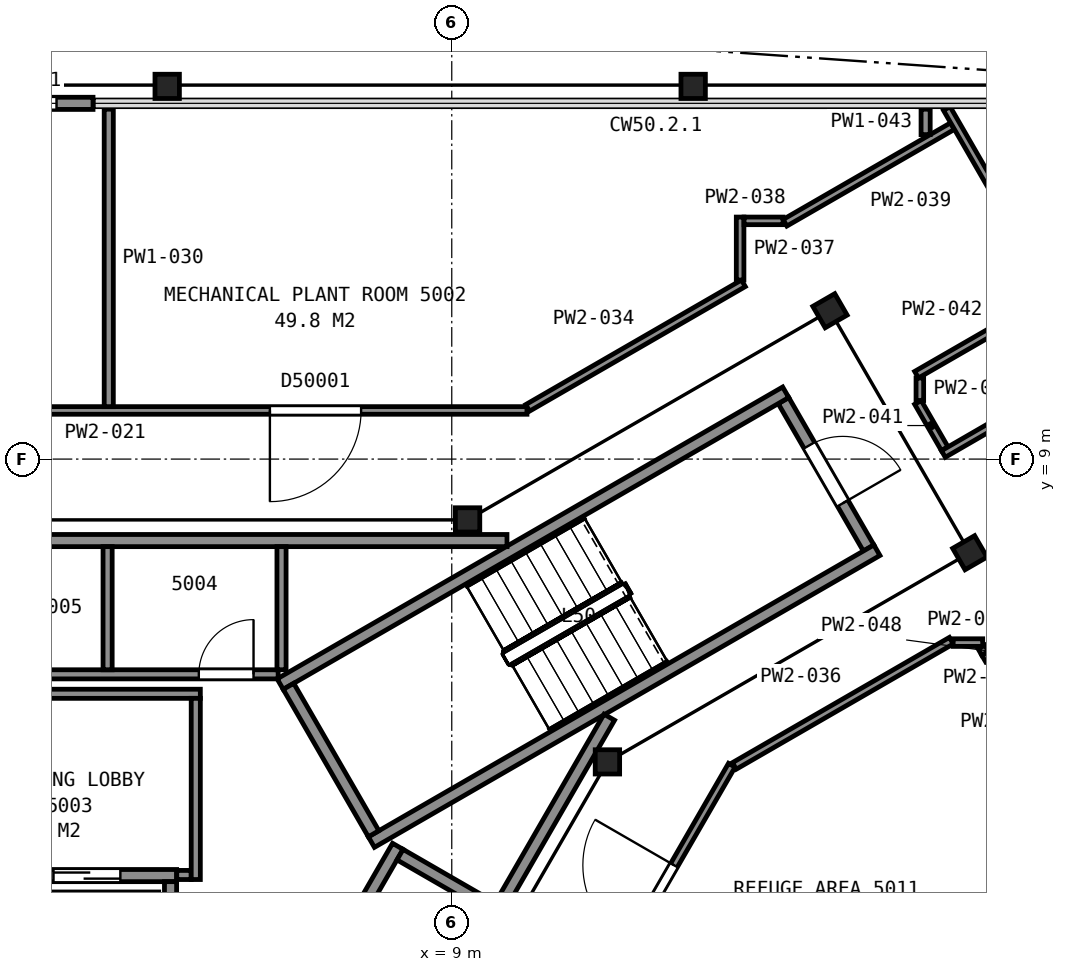
"""IFC4 building model, lengths in metres.
Left out: names, types, materials, properties, quantities, classifications, styles, units other than length and angle.
Written with IfcOpenShell. Run it as: python <this file> out.ifc"""

import sys

from ifc_helpers import new_model, si_unit, direction, frame, frame_2d, origin, origin_2d, place, context, subcontext, project, spatial, rectangle, i_section, extrude, element, fill, save


model = new_model("IFC4")
c1 = context("Model", 3, precision=1e-05, world=origin(), true_north=direction((0.0, 1.0)))
c2 = subcontext(c1, "Body", "Model", "MODEL_VIEW")
j1 = project(units=[si_unit("LENGTHUNIT", "METRE"), si_unit("PLANEANGLEUNIT", "RADIAN")], contexts=[c1])
p1 = place(None, origin())
s1 = spatial("IfcSite", under=j1, at=p1, CompositionType="ELEMENT")
p2 = place(p1, origin())
s2 = spatial("IfcBuilding", under=s1, at=p2, CompositionType="ELEMENT")
p3 = place(p2, frame((0.0, 0.0, 200.6)))
s3 = spatial("IfcBuildingStorey", under=s2, at=p3, CompositionType="ELEMENT", Elevation=200.6)
for number, where, z_axis, x_axis in (
    (1, (12.97, 15.13, -0.16), (0.0, 0.0, 1.0), (1.0, 0.0, 0.0)),
    (2, (4.32, 15.13, -0.16), (0.0, 0.0, 1.0), (1.0, 0.0, 0.0)),
):
    element("IfcColumn", number, at=place(p3, frame(where, z_axis=z_axis, x_axis=x_axis)), inside=s3, PredefinedType="COLUMN", context=c2, shape_type="SweptSolid", body=[
        extrude(i_section(OverallWidth=0.401, OverallDepth=0.399, WebThickness=0.025, FlangeThickness=0.04, FilletRadius=0.015, at=origin_2d()), origin(), (0.0, 0.0, 1.0), 5.96),
    ])
p4 = place(p3, frame((11.56, 4.02, 0.0), z_axis=(0.0, 0.0, 1.0), x_axis=(1.0, 0.0, 0.0)))
e3 = element("IfcColumn", 3, at=p4, inside=s3, PredefinedType="COLUMN", context=c2, shape_type="SweptSolid", body=[
    extrude(i_section(OverallWidth=0.401, OverallDepth=0.399, WebThickness=0.025, FlangeThickness=0.04, FilletRadius=0.015, at=origin_2d()), origin(), (0.0, 0.0, 1.0), 5.8),
])
for number, where, z_axis, x_axis in (
    (4, (17.52, 7.46, 0.0), (0.0, 0.0, 1.0), (0.5, -0.866, 0.0)),
    (5, (15.22, 11.44, 0.0), (0.0, 0.0, 1.0), (0.5, -0.866, 0.0)),
):
    element("IfcColumn", number, at=place(p3, frame(where, z_axis=z_axis, x_axis=x_axis)), inside=s3, PredefinedType="COLUMN", context=c2, shape_type="SweptSolid", body=[
        extrude(i_section(OverallWidth=0.406, OverallDepth=0.417, WebThickness=0.03, FlangeThickness=0.048, FilletRadius=0.015, at=origin_2d()), origin(), (0.0, 0.0, 1.0), 5.8),
    ])
p5 = place(p3, frame((9.26, 8.0, 0.0), z_axis=(0.0, 0.0, 1.0), x_axis=(1.0, 0.0, 0.0)))
e6 = element("IfcColumn", 6, at=p5, inside=s3, PredefinedType="COLUMN", context=c2, shape_type="SweptSolid", body=[
    extrude(i_section(OverallWidth=0.401, OverallDepth=0.399, WebThickness=0.025, FlangeThickness=0.04, FilletRadius=0.015, at=origin_2d()), origin(), (0.0, 0.0, 1.0), 5.8),
])
p6 = place(p3, frame((3.1, 14.851, 0.0), z_axis=(0.0, 0.0, 1.0), x_axis=(-1.0, 0.0, 0.0)))
e7 = element("IfcWall", 7, at=p6, inside=s3, PredefinedType="SOLIDWALL", context=c2, shape_type="SweptSolid", body=[
    extrude(rectangle(XDim=6.2, YDim=0.2, at=frame_2d((3.1, 0.0))), origin(), (0.0, 0.0, 1.0), 4.522),
])
p7 = place(p6, frame((0.6, 0.0, 0.9)))
e8 = element("IfcOpeningElement", 8, at=p7, cuts=e7, PredefinedType="OPENING", context=c2, shape_type="SweptSolid", body=[
    extrude(rectangle(XDim=1.0, YDim=1.5, at=frame_2d((0.5, 0.75))), frame((0.0, 0.11, 0.0), z_axis=(0.0, -1.0, 0.0), x_axis=(1.0, 0.0, 0.0)), (0.0, 0.0, 1.0), 0.22),
])
p8 = place(p6, frame((2.2, 0.0, 0.0)))
e9 = element("IfcOpeningElement", 9, at=p8, cuts=e7, PredefinedType="OPENING", context=c2, shape_type="SweptSolid", body=[
    extrude(rectangle(XDim=1.8, YDim=2.4, at=frame_2d((0.9, 1.2))), frame((0.0, 0.11, 0.0), z_axis=(0.0, -1.0, 0.0), x_axis=(1.0, 0.0, 0.0)), (0.0, 0.0, 1.0), 0.22),
])
p9 = place(p6, frame((4.6, 0.0, 0.9)))
e10 = element("IfcOpeningElement", 10, at=p9, cuts=e7, PredefinedType="OPENING", context=c2, shape_type="SweptSolid", body=[
    extrude(rectangle(XDim=1.0, YDim=1.5, at=frame_2d((0.5, 0.75))), frame((0.0, 0.11, 0.0), z_axis=(0.0, -1.0, 0.0), x_axis=(1.0, 0.0, 0.0)), (0.0, 0.0, 1.0), 0.22),
])
p10 = place(p3, frame((16.267, -1.527, 0.0), z_axis=(0.0, 0.0, 1.0), x_axis=(0.499997426962, 0.866026889324, 0.0)))
e11 = element("IfcWall", 11, at=p10, inside=s3, PredefinedType="SOLIDWALL", context=c2, shape_type="SweptSolid", body=[
    extrude(rectangle(XDim=6.2, YDim=0.2, at=frame_2d((3.1, 0.0))), origin(), (0.0, 0.0, 1.0), 4.522),
])
p11 = place(p10, frame((0.6, 0.0, 0.9)))
e12 = element("IfcOpeningElement", 12, at=p11, cuts=e11, PredefinedType="OPENING", context=c2, shape_type="SweptSolid", body=[
    extrude(rectangle(XDim=1.0, YDim=1.5, at=frame_2d((0.5, 0.75))), frame((0.0, 0.11, 0.0), z_axis=(0.0, -1.0, 0.0), x_axis=(1.0, 0.0, 0.0)), (0.0, 0.0, 1.0), 0.22),
])
p12 = place(p10, frame((2.2, 0.0, 0.0)))
e13 = element("IfcOpeningElement", 13, at=p12, cuts=e11, PredefinedType="OPENING", context=c2, shape_type="SweptSolid", body=[
    extrude(rectangle(XDim=1.8, YDim=2.4, at=frame_2d((0.9, 1.2))), frame((0.0, 0.11, 0.0), z_axis=(0.0, -1.0, 0.0), x_axis=(1.0, 0.0, 0.0)), (0.0, 0.0, 1.0), 0.22),
])
p13 = place(p10, frame((4.6, 0.0, 0.9)))
e14 = element("IfcOpeningElement", 14, at=p13, cuts=e11, PredefinedType="OPENING", context=c2, shape_type="SweptSolid", body=[
    extrude(rectangle(XDim=1.0, YDim=1.5, at=frame_2d((0.5, 0.75))), frame((0.0, 0.11, 0.0), z_axis=(0.0, -1.0, 0.0), x_axis=(1.0, 0.0, 0.0)), (0.0, 0.0, 1.0), 0.22),
])
p14 = place(p3, frame((15.855, 7.538, 0.0), z_axis=(0.0, 0.0, 1.0), x_axis=(-0.500049511043, 0.865996816683, 0.0)))
e15 = element("IfcWall", 15, at=p14, inside=s3, PredefinedType="PARTITIONING", context=c2, shape_type="SweptSolid", body=[
    extrude(rectangle(XDim=2.8, YDim=0.2, at=frame_2d((1.4, 0.0))), origin(), (0.0, 0.0, 1.0), 5.55),
])
p15 = place(p14, frame((0.85, 0.0, 0.0)))
e16 = element("IfcOpeningElement", 16, at=p15, cuts=e15, PredefinedType="OPENING", context=c2, shape_type="SweptSolid", body=[
    extrude(rectangle(XDim=1.1, YDim=2.1, at=frame_2d((0.55, 1.05))), frame((0.0, 0.11, 0.0), z_axis=(0.0, -1.0, 0.0), x_axis=(1.0, 0.0, 0.0)), (0.0, 0.0, 1.0), 0.22),
])
for number, where, z_axis, x_axis in (
    (17, (6.178, 5.299, 0.0), (0.0, 0.0, 1.0), (0.866, 0.5, 0.0)),
    (18, (7.678, 2.701, 0.0), (0.0, 0.0, 1.0), (0.866, 0.5, 0.0)),
):
    element("IfcWall", number, at=place(p3, frame(where, z_axis=z_axis, x_axis=x_axis)), inside=s3, PredefinedType="PARTITIONING", context=c2, shape_type="SweptSolid", body=[
        extrude(rectangle(XDim=9.6, YDim=0.2, at=frame_2d((4.8, 0.0))), origin(), (0.0, 0.0, 1.0), 5.55),
    ])
p16 = place(p3, frame((7.715, 2.838, 0.0), z_axis=(0.0, 0.0, 1.0), x_axis=(-0.500049511043, 0.865996816683, 0.0)))
e19 = element("IfcWall", 19, at=p16, inside=s3, PredefinedType="PARTITIONING", context=c2, shape_type="SweptSolid", body=[
    extrude(rectangle(XDim=2.8, YDim=0.2, at=frame_2d((1.4, 0.0))), origin(), (0.0, 0.0, 1.0), 5.55),
])
p17 = place(p3, frame((1.525, 2.15, 0.0), z_axis=(0.0, 0.0, 1.0), x_axis=(1.0, 0.0, 0.0)))
e20 = element("IfcWall", 20, at=p17, inside=s3, PredefinedType="PARTITIONING", context=c2, shape_type="SweptSolid", body=[
    extrude(rectangle(XDim=2.95, YDim=0.2, at=frame_2d((1.475, 0.0))), origin(), (0.0, 0.0, 1.0), 5.8),
])
p18 = place(p17, frame((0.925, 0.0, 0.0)))
e21 = element("IfcOpeningElement", 21, at=p18, cuts=e20, PredefinedType="OPENING", context=c2, shape_type="SweptSolid", body=[
    extrude(rectangle(XDim=1.1, YDim=2.1, at=frame_2d((0.55, 1.05))), frame((0.0, 0.11, 0.0), z_axis=(0.0, -1.0, 0.0), x_axis=(1.0, 0.0, 0.0)), (0.0, 0.0, 1.0), 0.22),
])
p19 = place(p3, frame((5.663, -1.612, 0.0), z_axis=(0.0, 0.0, 1.0), x_axis=(0.49998122708, 0.866036242063, 0.0)))
e22 = element("IfcWall", 22, at=p19, inside=s3, PredefinedType="PARTITIONING", context=c2, shape_type="SweptSolid", body=[
    extrude(rectangle(XDim=4.9, YDim=0.2, at=frame_2d((2.45, 0.0))), origin(), (0.0, 0.0, 1.0), 5.8),
])
p20 = place(p3, frame((4.375, 0.1, 0.0), z_axis=(0.0, 0.0, 1.0), x_axis=(0.0, 1.0, 0.0)))
e23 = element("IfcWall", 23, at=p20, inside=s3, PredefinedType="PARTITIONING", context=c2, shape_type="SweptSolid", body=[
    extrude(rectangle(XDim=1.95, YDim=0.2, at=frame_2d((0.975, 0.0))), origin(), (0.0, 0.0, 1.0), 5.8),
])
p21 = place(p3, frame((9.665, 1.62, 0.0), z_axis=(0.0, 0.0, 1.0), x_axis=(-0.866002029911, 0.500040482552, 0.0)))
e24 = element("IfcWall", 24, at=p21, inside=s3, PredefinedType="PARTITIONING", context=c2, shape_type="SweptSolid", body=[
    extrude(rectangle(XDim=1.75, YDim=0.2, at=frame_2d((0.875, 0.0))), origin(), (0.0, 0.0, 1.0), 5.8),
])
p22 = place(p3, frame((-3.933, 7.66, 0.0), z_axis=(0.0, 0.0, 1.0), x_axis=(1.0, 0.0, 0.0)))
e25 = element("IfcWall", 25, at=p22, inside=s3, PredefinedType="PARTITIONING", context=c2, shape_type="SweptSolid", body=[
    extrude(rectangle(XDim=13.841, YDim=0.2, at=frame_2d((6.92, 0.0))), origin(), (0.0, 0.0, 1.0), 5.55),
])
p23 = place(p3, frame((-0.245, 5.14, 0.0), z_axis=(0.0, 0.0, 1.0), x_axis=(1.0, 0.0, 0.0)))
e26 = element("IfcWall", 26, at=p23, inside=s3, PredefinedType="PARTITIONING", context=c2, shape_type="SweptSolid", body=[
    extrude(rectangle(XDim=5.11, YDim=0.15, at=frame_2d((2.555, 0.0))), origin(), (0.0, 0.0, 1.0), 5.55),
])
p24 = place(p23, frame((0.175, 0.0, 0.0)))
e27 = element("IfcOpeningElement", 27, at=p24, cuts=e26, PredefinedType="OPENING", context=c2, shape_type="SweptSolid", body=[
    extrude(rectangle(XDim=1.0, YDim=2.1, at=frame_2d((0.5, 1.05))), frame((0.0, 0.085, 0.0), z_axis=(0.0, -1.0, 0.0), x_axis=(1.0, 0.0, 0.0)), (0.0, 0.0, 1.0), 0.17),
])
p25 = place(p3, frame((0.925, 5.46, 0.0), z_axis=(0.0, 0.0, 1.0), x_axis=(1.0, 0.0, 0.0)))
e28 = element("IfcWall", 28, at=p25, inside=s3, PredefinedType="PARTITIONING", context=c2, shape_type="SweptSolid", body=[
    extrude(rectangle(XDim=5.22, YDim=0.15, at=frame_2d((2.61, 0.0))), origin(), (0.0, 0.0, 1.0), 5.55),
])
p26 = place(p25, frame((3.915, 0.0, 0.0)))
e29 = element("IfcOpeningElement", 29, at=p26, cuts=e28, PredefinedType="OPENING", context=c2, shape_type="SweptSolid", body=[
    extrude(rectangle(XDim=0.9, YDim=2.1, at=frame_2d((0.45, 1.05))), frame((0.0, 0.085, 0.0), z_axis=(0.0, -1.0, 0.0), x_axis=(1.0, 0.0, 0.0)), (0.0, 0.0, 1.0), 0.17),
])
p27 = place(p3, frame((3.34, 5.535, 0.0), z_axis=(0.0, 0.0, 1.0), x_axis=(0.0, 1.0, 0.0)))
e30 = element("IfcWall", 30, at=p27, inside=s3, PredefinedType="PARTITIONING", context=c2, shape_type="SweptSolid", body=[
    extrude(rectangle(XDim=2.025, YDim=0.15, at=frame_2d((1.013, 0.0))), origin(), (0.0, 0.0, 1.0), 5.55),
])
p28 = place(p3, frame((4.477, 2.16, 0.0), z_axis=(0.0, 0.0, 1.0), x_axis=(1.0, 0.0, 0.0)))
e31 = element("IfcWall", 31, at=p28, inside=s3, PredefinedType="PARTITIONING", context=c2, shape_type="SweptSolid", body=[
    extrude(rectangle(XDim=0.238, YDim=0.15, at=frame_2d((0.119, 0.0))), origin(), (0.0, 0.0, 1.0), 5.55),
])
p29 = place(p3, frame((4.79, 2.085, 0.0), z_axis=(0.0, 0.0, 1.0), x_axis=(0.0, 1.0, 0.0)))
e32 = element("IfcWall", 32, at=p29, inside=s3, PredefinedType="PARTITIONING", context=c2, shape_type="SweptSolid", body=[
    extrude(rectangle(XDim=2.98, YDim=0.15, at=frame_2d((1.49, 0.0))), origin(), (0.0, 0.0, 1.0), 5.55),
])
p30 = place(p3, frame((6.2, 5.535, 0.0), z_axis=(0.0, 0.0, 1.0), x_axis=(0.0, 1.0, 0.0)))
e33 = element("IfcWall", 33, at=p30, inside=s3, PredefinedType="PARTITIONING", context=c2, shape_type="SweptSolid", body=[
    extrude(rectangle(XDim=2.025, YDim=0.15, at=frame_2d((1.013, 0.0))), origin(), (0.0, 0.0, 1.0), 5.55),
])
p31 = place(p3, frame((9.803, 1.658, 0.0), z_axis=(0.0, 0.0, 1.0), x_axis=(0.499943114462, 0.866058244174, 0.0)))
e34 = element("IfcWall", 34, at=p31, inside=s3, PredefinedType="PARTITIONING", context=c2, shape_type="SweptSolid", body=[
    extrude(rectangle(XDim=3.576, YDim=0.2, at=frame_2d((1.788, 0.0))), origin(), (0.0, 0.0, 1.0), 5.55),
])
p32 = place(p3, frame((-10.237, 9.8, 0.0), z_axis=(0.0, 0.0, 1.0), x_axis=(1.0, 0.0, 0.0)))
e35 = element("IfcWall", 35, at=p32, inside=s3, PredefinedType="PARTITIONING", context=c2, shape_type="SweptSolid", body=[
    extrude(rectangle(XDim=20.473, YDim=0.125, at=frame_2d((10.237, 0.0))), origin(), (0.0, 0.0, 1.0), 4.462),
])
p33 = place(p32, frame((16.246, 0.0, 0.0)))
e36 = element("IfcOpeningElement", 36, at=p33, cuts=e35, PredefinedType="OPENING", context=c2, shape_type="SweptSolid", body=[
    extrude(rectangle(XDim=1.5, YDim=2.1, at=frame_2d((0.75, 1.05))), frame((0.0, 0.073, 0.0), z_axis=(0.0, -1.0, 0.0), x_axis=(1.0, 0.0, 0.0)), (0.0, 0.0, 1.0), 0.145),
])
p34 = place(p32, frame((9.627, 0.0, 0.0)))
e37 = element("IfcOpeningElement", 37, at=p34, cuts=e35, PredefinedType="OPENING", context=c2, shape_type="SweptSolid", body=[
    extrude(rectangle(XDim=1.2, YDim=2.1, at=frame_2d((0.6, 1.05))), frame((0.0, 0.073, 0.0), z_axis=(0.0, -1.0, 0.0), x_axis=(1.0, 0.0, 0.0)), (0.0, 0.0, 1.0), 0.145),
])
p35 = place(p32, frame((2.712, 0.0, 0.0)))
e38 = element("IfcOpeningElement", 38, at=p35, cuts=e35, PredefinedType="OPENING", context=c2, shape_type="SweptSolid", body=[
    extrude(rectangle(XDim=1.5, YDim=2.1, at=frame_2d((0.75, 1.05))), frame((0.0, 0.073, 0.0), z_axis=(0.0, -1.0, 0.0), x_axis=(1.0, 0.0, 0.0)), (0.0, 0.0, 1.0), 0.145),
])
p36 = place(p3, frame((3.359, 9.863, 0.0), z_axis=(0.0, 0.0, 1.0), x_axis=(0.0, 1.0, 0.0)))
e39 = element("IfcWall", 39, at=p36, inside=s3, PredefinedType="PARTITIONING", context=c2, shape_type="SweptSolid", body=[
    extrude(rectangle(XDim=4.892, YDim=0.15, at=frame_2d((2.446, 0.0))), origin(), (0.0, 0.0, 1.0), 4.462),
])
p37 = place(p3, frame((13.605, 3.965, 0.0), z_axis=(0.0, 0.0, 1.0), x_axis=(-0.499989213553, -0.866031631253, 0.0)))
e40 = element("IfcWall", 40, at=p37, inside=s3, PredefinedType="PARTITIONING", context=c2, shape_type="SweptSolid", body=[
    extrude(rectangle(XDim=19.41, YDim=0.125, at=frame_2d((9.705, 0.0))), origin(), (0.0, 0.0, 1.0), 4.462),
])
p38 = place(p37, frame((1.899, 0.0, 0.0)))
e41 = element("IfcOpeningElement", 41, at=p38, cuts=e40, PredefinedType="OPENING", context=c2, shape_type="SweptSolid", body=[
    extrude(rectangle(XDim=1.5, YDim=2.1, at=frame_2d((0.75, 1.05))), frame((0.0, 0.073, 0.0), z_axis=(0.0, -1.0, 0.0), x_axis=(1.0, 0.0, 0.0)), (0.0, 0.0, 1.0), 0.145),
])
p39 = place(p3, frame((10.248, 9.843, 0.0), z_axis=(0.0, 0.0, 1.0), x_axis=(0.866019886808, 0.500009555562, 0.0)))
e42 = element("IfcWall", 42, at=p39, inside=s3, PredefinedType="PARTITIONING", context=c2, shape_type="SweptSolid", body=[
    extrude(rectangle(XDim=4.098, YDim=0.125, at=frame_2d((2.049, 0.0))), origin(), (0.0, 0.0, 1.0), 4.462),
])
p40 = place(p3, frame((13.648, 3.954, 0.0), z_axis=(0.0, 0.0, 1.0), x_axis=(0.866031617834, 0.499989236795, 0.0)))
e43 = element("IfcWall", 43, at=p40, inside=s3, PredefinedType="PARTITIONING", context=c2, shape_type="SweptSolid", body=[
    extrude(rectangle(XDim=4.119, YDim=0.125, at=frame_2d((2.06, 0.0))), origin(), (0.0, 0.0, 1.0), 4.462),
])
p41 = place(p3, frame((13.742, 11.945, 0.0), z_axis=(0.0, 0.0, 1.0), x_axis=(0.0, 1.0, 0.0)))
e44 = element("IfcWall", 44, at=p41, inside=s3, PredefinedType="PARTITIONING", context=c2, shape_type="SweptSolid", body=[
    extrude(rectangle(XDim=1.035, YDim=0.125, at=frame_2d((0.518, 0.0))), origin(), (0.0, 0.0, 1.0), 4.462),
])
p42 = place(p3, frame((13.807, 12.918, 0.0), z_axis=(0.0, 0.0, 1.0), x_axis=(1.0, 0.0, 0.0)))
e45 = element("IfcWall", 45, at=p42, inside=s3, PredefinedType="PARTITIONING", context=c2, shape_type="SweptSolid", body=[
    extrude(rectangle(XDim=0.642, YDim=0.125, at=frame_2d((0.321, 0.0))), origin(), (0.0, 0.0, 1.0), 4.462),
])
p43 = place(p3, frame((14.48, 12.887, 0.0), z_axis=(0.0, 0.0, 1.0), x_axis=(0.866156179635, 0.499773421142, 0.0)))
e46 = element("IfcWall", 46, at=p43, inside=s3, PredefinedType="PARTITIONING", context=c2, shape_type="SweptSolid", body=[
    extrude(rectangle(XDim=3.179, YDim=0.125, at=frame_2d((1.59, 0.0))), origin(), (0.0, 0.0, 1.0), 4.462),
])
p44 = place(p3, frame((16.698, 9.963, 0.0), z_axis=(0.0, 0.0, 1.0), x_axis=(0.0, 1.0, 0.0)))
e47 = element("IfcWall", 47, at=p44, inside=s3, PredefinedType="PARTITIONING", context=c2, shape_type="SweptSolid", body=[
    extrude(rectangle(XDim=0.371, YDim=0.125, at=frame_2d((0.186, 0.0))), origin(), (0.0, 0.0, 1.0), 4.462),
])
p45 = place(p3, frame((16.667, 9.932, 0.0), z_axis=(0.0, 0.0, 1.0), x_axis=(0.500411837378, -0.865787498762, 0.0)))
e48 = element("IfcWall", 48, at=p45, inside=s3, PredefinedType="PARTITIONING", context=c2, shape_type="SweptSolid", body=[
    extrude(rectangle(XDim=0.879, YDim=0.125, at=frame_2d((0.439, 0.0))), origin(), (0.0, 0.0, 1.0), 4.462),
])
p46 = place(p3, frame((16.644, 10.388, 0.0), z_axis=(0.0, 0.0, 1.0), x_axis=(0.866389293917, 0.499369193469, 0.0)))
e49 = element("IfcWall", 49, at=p46, inside=s3, PredefinedType="PARTITIONING", context=c2, shape_type="SweptSolid", body=[
    extrude(rectangle(XDim=2.553, YDim=0.125, at=frame_2d((1.276, 0.0))), origin(), (0.0, 0.0, 1.0), 4.462),
])
p47 = place(p3, frame((16.793, 14.336, 0.0), z_axis=(0.0, 0.0, 1.0), x_axis=(0.0, 1.0, 0.0)))
e50 = element("IfcWall", 50, at=p47, inside=s3, PredefinedType="PARTITIONING", context=c2, shape_type="SweptSolid", body=[
    extrude(rectangle(XDim=0.418, YDim=0.15, at=frame_2d((0.209, 0.0))), origin(), (0.0, 0.0, 1.0), 4.462),
])
p48 = place(p3, frame((17.085, 9.084, 0.0), z_axis=(0.0, 0.0, 1.0), x_axis=(0.865499315081, 0.500910107299, 0.0)))
e51 = element("IfcWall", 51, at=p48, inside=s3, PredefinedType="PARTITIONING", context=c2, shape_type="SweptSolid", body=[
    extrude(rectangle(XDim=2.823, YDim=0.125, at=frame_2d((1.411, 0.0))), origin(), (0.0, 0.0, 1.0), 4.462),
])
p49 = place(p3, frame((17.246, 5.982, 0.0), z_axis=(0.0, 0.0, 1.0), x_axis=(1.0, 0.0, 0.0)))
e52 = element("IfcWall", 52, at=p49, inside=s3, PredefinedType="PARTITIONING", context=c2, shape_type="SweptSolid", body=[
    extrude(rectangle(XDim=0.485, YDim=0.125, at=frame_2d((0.243, 0.0))), origin(), (0.0, 0.0, 1.0), 4.462),
])
p50 = place(p3, frame((17.141, 14.766, 0.0), z_axis=(0.0, 0.0, 1.0), x_axis=(0.499517355343, -0.866303879543, 0.0)))
e53 = element("IfcWall", 53, at=p50, inside=s3, PredefinedType="PARTITIONING", context=c2, shape_type="SweptSolid", body=[
    extrude(rectangle(XDim=3.607, YDim=0.125, at=frame_2d((1.803, 0.0))), origin(), (0.0, 0.0, 1.0), 4.462),
])
p51 = place(p3, frame((17.711, 5.908, 0.0), z_axis=(0.0, 0.0, 1.0), x_axis=(0.499195341736, -0.86648947529, 0.0)))
e54 = element("IfcWall", 54, at=p51, inside=s3, PredefinedType="PARTITIONING", context=c2, shape_type="SweptSolid", body=[
    extrude(rectangle(XDim=0.12, YDim=0.125, at=frame_2d((0.06, 0.0))), origin(), (0.0, 0.0, 1.0), 4.462),
])
p52 = place(p3, frame((17.75, 5.717, 0.0), z_axis=(0.0, 0.0, 1.0), x_axis=(0.865150363836, 0.501512560116, 0.0)))
e55 = element("IfcWall", 55, at=p52, inside=s3, PredefinedType="PARTITIONING", context=c2, shape_type="SweptSolid", body=[
    extrude(rectangle(XDim=0.444, YDim=0.125, at=frame_2d((0.222, 0.0))), origin(), (0.0, 0.0, 1.0), 4.462),
])
p53 = place(p7, origin())
e56 = element("IfcWindow", 56, at=p53, inside=s3, PartitioningType="SINGLE_PANEL", PredefinedType="WINDOW", context=c2, shape_type="SweptSolid", body=[
    extrude(rectangle(XDim=1.0, YDim=1.5, at=frame_2d((0.5, 0.75))), frame((0.0, 0.03, 0.0), z_axis=(0.0, -1.0, 0.0), x_axis=(1.0, 0.0, 0.0)), (0.0, 0.0, 1.0), 0.06),
])
fill(e8, e56)
p54 = place(p12, frame((1.8, 0.0, 0.0), z_axis=(0.0, 0.0, 1.0), x_axis=(-1.0, 0.0, 0.0)))
e57 = element("IfcDoor", 57, at=p54, inside=s3, OperationType="DOUBLE_DOOR_SINGLE_SWING", PredefinedType="DOOR", context=c2, shape_type="SweptSolid", body=[
    extrude(rectangle(XDim=1.8, YDim=2.4, at=frame_2d((0.9, 1.2))), frame((0.0, 0.025, 0.0), z_axis=(0.0, -1.0, 0.0), x_axis=(1.0, 0.0, 0.0)), (0.0, 0.0, 1.0), 0.05),
])
fill(e13, e57)
p55 = place(p15, origin())
e58 = element("IfcDoor", 58, at=p55, inside=s3, OperationType="SINGLE_SWING_LEFT", PredefinedType="DOOR", context=c2, shape_type="SweptSolid", body=[
    extrude(rectangle(XDim=1.1, YDim=2.1, at=frame_2d((0.55, 1.05))), frame((0.0, 0.025, 0.0), z_axis=(0.0, -1.0, 0.0), x_axis=(1.0, 0.0, 0.0)), (0.0, 0.0, 1.0), 0.05),
])
fill(e16, e58)
p56 = place(p18, origin())
e59 = element("IfcDoor", 59, at=p56, inside=s3, OperationType="SLIDING_TO_RIGHT", PredefinedType="DOOR", context=c2, shape_type="SweptSolid", body=[
    extrude(rectangle(XDim=1.1, YDim=2.1, at=frame_2d((0.55, 1.05))), frame((0.0, 0.025, 0.0), z_axis=(0.0, -1.0, 0.0), x_axis=(1.0, 0.0, 0.0)), (0.0, 0.0, 1.0), 0.05),
])
fill(e21, e59)
p57 = place(p26, origin())
e60 = element("IfcDoor", 60, at=p57, inside=s3, OperationType="SINGLE_SWING_RIGHT", PredefinedType="DOOR", context=c2, shape_type="SweptSolid", body=[
    extrude(rectangle(XDim=0.9, YDim=2.1, at=frame_2d((0.45, 1.05))), frame((0.0, 0.025, 0.0), z_axis=(0.0, -1.0, 0.0), x_axis=(1.0, 0.0, 0.0)), (0.0, 0.0, 1.0), 0.05),
])
fill(e29, e60)
p58 = place(p33, origin())
e61 = element("IfcDoor", 61, at=p58, inside=s3, OperationType="DOUBLE_DOOR_SINGLE_SWING", PredefinedType="DOOR", context=c2, shape_type="SweptSolid", body=[
    extrude(rectangle(XDim=1.5, YDim=2.1, at=frame_2d((0.75, 1.05))), frame((0.0, 0.025, 0.0), z_axis=(0.0, -1.0, 0.0), x_axis=(1.0, 0.0, 0.0)), (0.0, 0.0, 1.0), 0.05),
])
fill(e36, e61)
p59 = place(p38, origin())
e62 = element("IfcDoor", 62, at=p59, inside=s3, OperationType="DOUBLE_DOOR_SINGLE_SWING", PredefinedType="DOOR", context=c2, shape_type="SweptSolid", body=[
    extrude(rectangle(XDim=1.5, YDim=2.1, at=frame_2d((0.75, 1.05))), frame((0.0, 0.025, 0.0), z_axis=(0.0, -1.0, 0.0), x_axis=(1.0, 0.0, 0.0)), (0.0, 0.0, 1.0), 0.05),
])
fill(e41, e62)
save(model, sys.argv[1])
